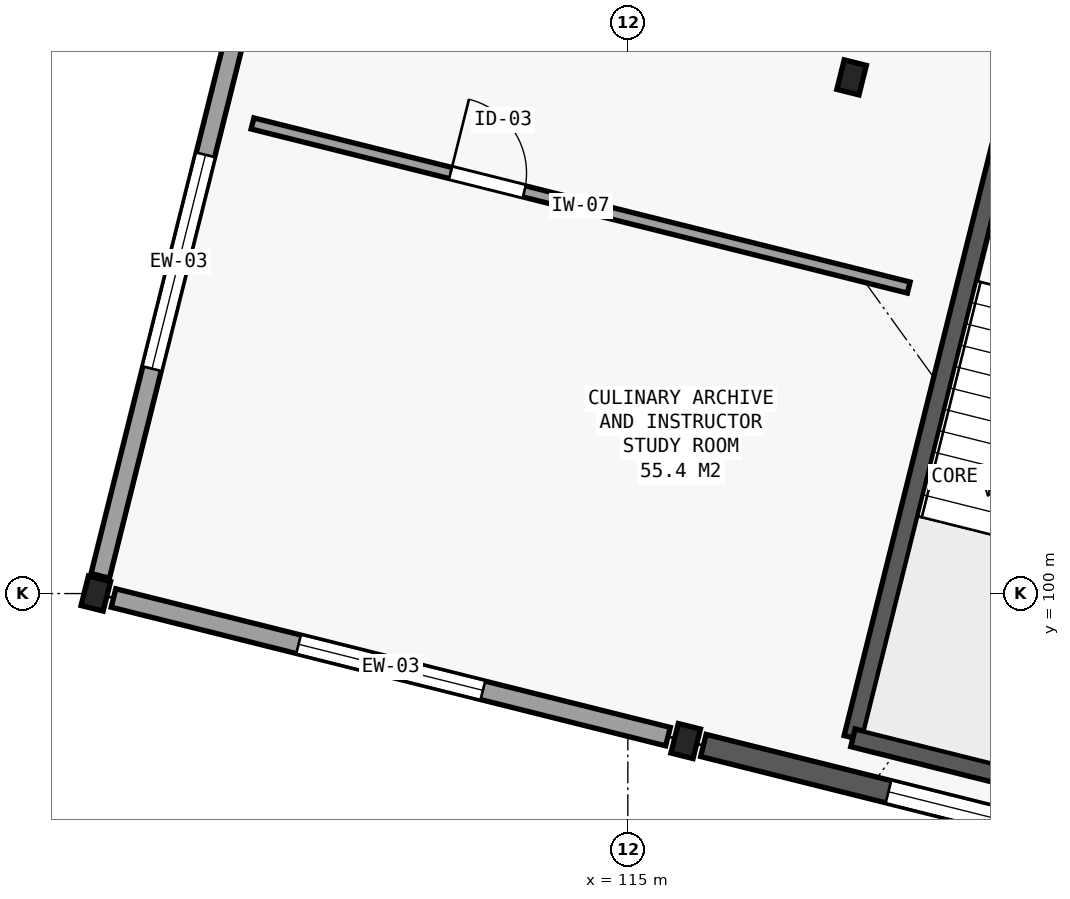
"""IFC4 building model, lengths in metres.
Left out: names, types, materials, properties, quantities, classifications, styles, units other than length and angle.
Written with IfcOpenShell. Run it as: python <this file> out.ifc"""

import sys

from ifc_helpers import new_model, si_unit, direction, frame, frame_2d, origin, origin_2d, place, context, subcontext, project, spatial, rectangle, i_section, extrude, element, fill, save


model = new_model("IFC4")
c1 = context("Model", 3, precision=1e-05, world=origin(), true_north=direction((0.0, 1.0)))
c2 = subcontext(c1, "Body", "Model", "MODEL_VIEW")
j1 = project(units=[si_unit("LENGTHUNIT", "METRE"), si_unit("PLANEANGLEUNIT", "RADIAN")], contexts=[c1])
p1 = place(None, origin())
s1 = spatial("IfcSite", under=j1, at=p1, CompositionType="ELEMENT")
p2 = place(p1, origin())
s2 = spatial("IfcBuilding", under=s1, at=p2, CompositionType="ELEMENT")
p3 = place(p2, frame((0.0, 0.0, 9.9)))
s3 = spatial("IfcBuildingStorey", under=s2, at=p3, CompositionType="ELEMENT", Elevation=9.9)
for number, where, z_axis, x_axis in (
    (1, (108.0, 100.0, 0.0), (0.0, 0.0, 1.0), (0.97, -0.243, 0.0)),
    (2, (115.761, 98.06, 0.0), (0.0, 0.0, 1.0), (0.97, -0.243, 0.0)),
    (3, (117.944, 106.791, 0.0), (0.0, 0.0, 1.0), (0.97, -0.243, 0.0)),
):
    element("IfcColumn", number, at=place(p3, frame(where, z_axis=z_axis, x_axis=x_axis)), inside=s3, PredefinedType="COLUMN", context=c2, shape_type="SweptSolid", body=[
        extrude(i_section(OverallWidth=0.3, OverallDepth=0.4, WebThickness=0.013, FlangeThickness=0.024, FilletRadius=0.027, at=origin_2d()), origin(), (0.0, 0.0, 1.0), 4.2),
    ])
p4 = place(p3, frame((115.528, 98.118, 0.0), z_axis=(0.0, 0.0, 1.0), x_axis=(-0.970138680536, 0.242550902961, 0.0)))
e4 = element("IfcWall", 4, at=p4, inside=s3, PredefinedType="SOLIDWALL", context=c2, shape_type="SweptSolid", body=[
    extrude(rectangle(XDim=7.52, YDim=0.25, at=frame_2d((3.76, 0.0))), origin(), (0.0, 0.0, 1.0), 3.545),
])
p5 = place(p4, frame((2.51, 0.0, 1.05)))
e5 = element("IfcOpeningElement", 5, at=p5, cuts=e4, PredefinedType="OPENING", context=c2, shape_type="SweptSolid", body=[
    extrude(rectangle(XDim=2.5, YDim=1.65, at=frame_2d((1.25, 0.825))), frame((0.0, 0.135, 0.0), z_axis=(0.0, -1.0, 0.0), x_axis=(1.0, 0.0, 0.0)), (0.0, 0.0, 1.0), 0.27),
])
p6 = place(p3, frame((123.29, 96.178, 0.0), z_axis=(0.0, 0.0, 1.0), x_axis=(-0.970148228972, 0.242512708578, 0.0)))
e6 = element("IfcWall", 6, at=p6, inside=s3, PredefinedType="SHEAR", context=c2, shape_type="SweptSolid", body=[
    extrude(rectangle(XDim=7.52, YDim=0.3, at=frame_2d((3.76, 0.0))), origin(), (0.0, 0.0, 1.0), 3.92),
])
p7 = place(p6, frame((2.51, 0.0, 1.05)))
e7 = element("IfcOpeningElement", 7, at=p7, cuts=e6, PredefinedType="OPENING", context=c2, shape_type="SweptSolid", body=[
    extrude(rectangle(XDim=2.5, YDim=1.65, at=frame_2d((1.25, 0.825))), frame((0.0, 0.16, 0.0), z_axis=(0.0, -1.0, 0.0), x_axis=(1.0, 0.0, 0.0)), (0.0, 0.0, 1.0), 0.32),
])
p8 = place(p3, frame((108.058, 100.233, 0.0), z_axis=(0.0, 0.0, 1.0), x_axis=(0.242535625036, 0.970142500145, 0.0)))
e8 = element("IfcWall", 8, at=p8, inside=s3, PredefinedType="SOLIDWALL", context=c2, shape_type="SweptSolid", body=[
    extrude(rectangle(XDim=8.52, YDim=0.25, at=frame_2d((4.26, 0.0))), origin(), (0.0, 0.0, 1.0), 3.495),
])
p9 = place(p8, frame((2.81, 0.0, 1.05)))
e9 = element("IfcOpeningElement", 9, at=p9, cuts=e8, PredefinedType="OPENING", context=c2, shape_type="SweptSolid", body=[
    extrude(rectangle(XDim=2.9, YDim=1.95, at=frame_2d((1.45, 0.975))), frame((0.0, 0.135, 0.0), z_axis=(0.0, -1.0, 0.0), x_axis=(1.0, 0.0, 0.0)), (0.0, 0.0, 1.0), 0.27),
])
p10 = place(p3, frame((117.962, 98.102, 0.0), z_axis=(0.0, 0.0, 1.0), x_axis=(0.242528444268, 0.970144295309, 0.0)))
e10 = element("IfcWall", 10, at=p10, inside=s3, PredefinedType="SOLIDWALL", context=c2, shape_type="SweptSolid", body=[
    extrude(rectangle(XDim=8.0, YDim=0.24, at=frame_2d((4.0, 0.0))), origin(), (0.0, 0.0, 1.0), 3.945),
])
p11 = place(p3, frame((121.6, 97.193, 0.0), z_axis=(0.0, 0.0, 1.0), x_axis=(-0.970131009923, 0.242581581301, 0.0)))
e11 = element("IfcWall", 11, at=p11, inside=s3, PredefinedType="SOLIDWALL", context=c2, shape_type="SweptSolid", body=[
    extrude(rectangle(XDim=3.75, YDim=0.24, at=frame_2d((1.875, 0.0))), origin(), (0.0, 0.0, 1.0), 3.945),
])
p12 = place(p3, frame((111.449, 111.734, 0.0), z_axis=(0.0, 0.0, 1.0), x_axis=(0.970141164196, -0.242540968772, 0.0)))
e12 = element("IfcWall", 12, at=p12, inside=s3, PredefinedType="PARTITIONING", context=c2, shape_type="SweptSolid", body=[
    extrude(rectangle(XDim=21.5, YDim=0.15, at=frame_2d((10.75, 0.0))), origin(), (0.0, 0.0, 1.0), 3.495),
])
p13 = place(p12, frame((9.95, 0.0, 0.0)))
e13 = element("IfcOpeningElement", 13, at=p13, cuts=e12, PredefinedType="OPENING", context=c2, shape_type="SweptSolid", body=[
    extrude(rectangle(XDim=1.6, YDim=2.2, at=frame_2d((0.8, 1.1))), frame((0.0, 0.085, 0.0), z_axis=(0.0, -1.0, 0.0), x_axis=(1.0, 0.0, 0.0)), (0.0, 0.0, 1.0), 0.17),
])
p14 = place(p3, frame((110.062, 106.185, 0.0), z_axis=(0.0, 0.0, 1.0), x_axis=(0.970145727306, -0.24252271603, 0.0)))
e14 = element("IfcWall", 14, at=p14, inside=s3, PredefinedType="PARTITIONING", context=c2, shape_type="SweptSolid", body=[
    extrude(rectangle(XDim=8.9, YDim=0.15, at=frame_2d((4.45, 0.0))), origin(), (0.0, 0.0, 1.0), 3.495),
])
p15 = place(p14, frame((2.686, 0.0, 0.0)))
e15 = element("IfcOpeningElement", 15, at=p15, cuts=e14, PredefinedType="OPENING", context=c2, shape_type="SweptSolid", body=[
    extrude(rectangle(XDim=1.0, YDim=2.15, at=frame_2d((0.5, 1.075))), frame((0.0, 0.085, 0.0), z_axis=(0.0, -1.0, 0.0), x_axis=(1.0, 0.0, 0.0)), (0.0, 0.0, 1.0), 0.17),
])
p16 = place(p5, origin())
e16 = element("IfcWindow", 16, at=p16, inside=s3, PartitioningType="SINGLE_PANEL", PredefinedType="WINDOW", context=c2, shape_type="SweptSolid", body=[
    extrude(rectangle(XDim=2.5, YDim=1.65, at=frame_2d((1.25, 0.825))), frame((0.0, 0.03, 0.0), z_axis=(0.0, -1.0, 0.0), x_axis=(1.0, 0.0, 0.0)), (0.0, 0.0, 1.0), 0.06),
])
fill(e5, e16)
p17 = place(p7, origin())
e17 = element("IfcWindow", 17, at=p17, inside=s3, PartitioningType="SINGLE_PANEL", PredefinedType="WINDOW", context=c2, shape_type="SweptSolid", body=[
    extrude(rectangle(XDim=2.5, YDim=1.65, at=frame_2d((1.25, 0.825))), frame((0.0, 0.03, 0.0), z_axis=(0.0, -1.0, 0.0), x_axis=(1.0, 0.0, 0.0)), (0.0, 0.0, 1.0), 0.06),
])
fill(e7, e17)
p18 = place(p9, origin())
e18 = element("IfcWindow", 18, at=p18, inside=s3, PartitioningType="SINGLE_PANEL", PredefinedType="WINDOW", context=c2, shape_type="SweptSolid", body=[
    extrude(rectangle(XDim=2.9, YDim=1.95, at=frame_2d((1.45, 0.975))), frame((0.0, 0.03, 0.0), z_axis=(0.0, -1.0, 0.0), x_axis=(1.0, 0.0, 0.0)), (0.0, 0.0, 1.0), 0.06),
])
fill(e9, e18)
p19 = place(p15, origin())
e19 = element("IfcDoor", 19, at=p19, inside=s3, OperationType="SINGLE_SWING_LEFT", PredefinedType="DOOR", context=c2, shape_type="SweptSolid", body=[
    extrude(rectangle(XDim=1.0, YDim=2.15, at=frame_2d((0.5, 1.075))), frame((0.0, 0.025, 0.0), z_axis=(0.0, -1.0, 0.0), x_axis=(1.0, 0.0, 0.0)), (0.0, 0.0, 1.0), 0.05),
])
fill(e15, e19)
save(model, sys.argv[1])
